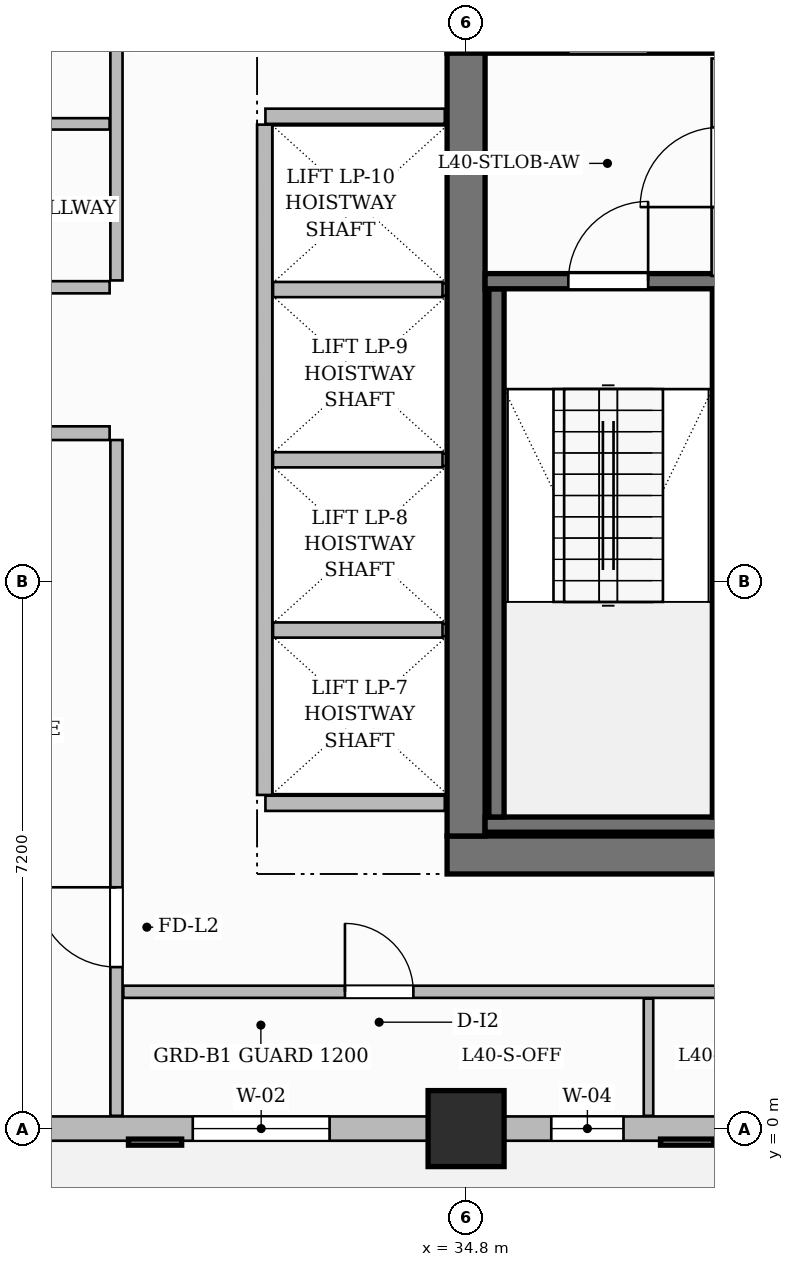
"""IFC4 building model, lengths in metres.
Left out: names, types, materials, properties, quantities, classifications, styles, units other than length and angle.
Written with IfcOpenShell. Run it as: python <this file> out.ifc"""

import sys

from ifc_helpers import new_model, si_unit, direction, frame, frame_2d, origin, origin_2d, place, context, subcontext, project, spatial, rectangle, extrude, source, transform, mapped, element, fill, save


model = new_model("IFC4")
c1 = context("Model", 3, precision=1e-05, world=origin(), true_north=direction((0.0, 1.0)))
c2 = subcontext(c1, "Body", "Model", "MODEL_VIEW")
j1 = project(units=[si_unit("LENGTHUNIT", "METRE"), si_unit("PLANEANGLEUNIT", "RADIAN")], contexts=[c1])
p1 = place(None, origin())
s1 = spatial("IfcSite", under=j1, at=p1, CompositionType="ELEMENT")
p2 = place(p1, origin())
s2 = spatial("IfcBuilding", under=s1, at=p2, CompositionType="ELEMENT")
p3 = place(p2, frame((0.0, 0.0, 161.85)))
s3 = spatial("IfcBuildingStorey", under=s2, at=p3, CompositionType="ELEMENT", Elevation=161.85)
p4 = place(p3, frame((34.55, 3.6, 0.0), z_axis=(0.0, 0.0, 1.0), x_axis=(1.0, 0.0, 0.0)))
e1 = element("IfcWall", 1, at=p4, inside=s3, PredefinedType="SHEAR", context=c2, shape_type="SweptSolid", body=[
    extrude(rectangle(XDim=15.5, YDim=0.5, at=frame_2d((7.75, 0.0))), origin(), (0.0, 0.0, 1.0), 3.85),
])
p5 = place(p4, frame((4.72, 0.0, 0.0)))
e2 = element("IfcOpeningElement", 2, at=p5, cuts=e1, PredefinedType="OPENING", context=c2, shape_type="SweptSolid", body=[
    extrude(rectangle(XDim=0.9, YDim=2.1, at=frame_2d((0.45, 1.05))), frame((0.0, 0.26, 0.0), z_axis=(0.0, -1.0, 0.0), x_axis=(1.0, 0.0, 0.0)), (0.0, 0.0, 1.0), 0.52),
])
p6 = place(p4, frame((7.1, 0.0, 0.0)))
e3 = element("IfcOpeningElement", 3, at=p6, cuts=e1, PredefinedType="OPENING", context=c2, shape_type="SweptSolid", body=[
    extrude(rectangle(XDim=0.9, YDim=2.1, at=frame_2d((0.45, 1.05))), frame((0.0, 0.26, 0.0), z_axis=(0.0, -1.0, 0.0), x_axis=(1.0, 0.0, 0.0)), (0.0, 0.0, 1.0), 0.52),
])
p7 = place(p3, frame((34.55, 14.4, 0.0), z_axis=(0.0, 0.0, 1.0), x_axis=(1.0, 0.0, 0.0)))
e4 = element("IfcWall", 4, at=p7, inside=s3, PredefinedType="SHEAR", context=c2, shape_type="SweptSolid", body=[
    extrude(rectangle(XDim=15.5, YDim=0.5, at=frame_2d((7.75, 0.0))), origin(), (0.0, 0.0, 1.0), 3.85),
])
p8 = place(p7, frame((5.38, 0.0, 0.0)))
e5 = element("IfcOpeningElement", 5, at=p8, cuts=e4, PredefinedType="OPENING", context=c2, shape_type="SweptSolid", body=[
    extrude(rectangle(XDim=1.5, YDim=2.2, at=frame_2d((0.75, 1.1))), frame((0.0, 0.26, 0.0), z_axis=(0.0, -1.0, 0.0), x_axis=(1.0, 0.0, 0.0)), (0.0, 0.0, 1.0), 0.52),
])
p9 = place(p7, frame((1.595, 0.0, 0.0)))
e6 = element("IfcOpeningElement", 6, at=p9, cuts=e4, PredefinedType="OPENING", context=c2, shape_type="SweptSolid", body=[
    extrude(rectangle(XDim=1.05, YDim=2.15, at=frame_2d((0.525, 1.075))), frame((0.0, 0.26, 0.0), z_axis=(0.0, -1.0, 0.0), x_axis=(1.0, 0.0, 0.0)), (0.0, 0.0, 1.0), 0.52),
])
p10 = place(p7, frame((11.225, 0.0, 0.0)))
e7 = element("IfcOpeningElement", 7, at=p10, cuts=e4, PredefinedType="OPENING", context=c2, shape_type="SweptSolid", body=[
    extrude(rectangle(XDim=1.05, YDim=2.15, at=frame_2d((0.525, 1.075))), frame((0.0, 0.26, 0.0), z_axis=(0.0, -1.0, 0.0), x_axis=(1.0, 0.0, 0.0)), (0.0, 0.0, 1.0), 0.52),
])
p11 = place(p3, frame((34.8, 3.85, 0.0), z_axis=(0.0, 0.0, 1.0), x_axis=(0.0, 1.0, 0.0)))
e8 = element("IfcWall", 8, at=p11, inside=s3, PredefinedType="SHEAR", context=c2, shape_type="SweptSolid", body=[
    extrude(rectangle(XDim=10.3, YDim=0.5, at=frame_2d((5.15, 0.0))), origin(), (0.0, 0.0, 1.0), 3.85),
])
m1 = source(origin(), c2, "Body", "SweptSolid", [
    extrude(rectangle(XDim=1.0, YDim=1.0, at=origin_2d()), origin(), (0.0, 0.0, 1.0), 3.85),
])
p12 = place(p3, frame((34.8, 0.0, 0.0), z_axis=(0.0, 0.0, 1.0), x_axis=(1.0, 0.0, 0.0)))
e9 = element("IfcColumn", 9, at=p12, inside=s3, PredefinedType="COLUMN", context=c2, shape_type="MappedRepresentation", body=[
    mapped(m1, transform((0.0, 0.0, 0.0), scale=1.0)),
])
p13 = place(p3, frame((35.05, 4.0, 0.0), z_axis=(0.0, 0.0, 1.0), x_axis=(1.0, 0.0, 0.0)))
e10 = element("IfcWall", 10, at=p13, inside=s3, PredefinedType="SHEAR", context=c2, shape_type="SweptSolid", body=[
    extrude(rectangle(XDim=3.19, YDim=0.2, at=frame_2d((1.595, 0.0))), origin(), (0.0, 0.0, 1.0), 3.85),
])
for number, where, z_axis, x_axis in (
    (11, (35.2, 4.1, 0.0), (0.0, 0.0, 1.0), (0.0, 1.0, 0.0)),
    (12, (38.14, 4.1, 0.0), (0.0, 0.0, 1.0), (0.0, 1.0, 0.0)),
):
    element("IfcWall", number, at=place(p3, frame(where, z_axis=z_axis, x_axis=x_axis)), inside=s3, PredefinedType="SHEAR", context=c2, shape_type="SweptSolid", body=[
        extrude(rectangle(XDim=6.95, YDim=0.2, at=frame_2d((3.475, 0.0))), origin(), (0.0, 0.0, 1.0), 3.85),
    ])
p14 = place(p3, frame((35.05, 11.15, 0.0), z_axis=(0.0, 0.0, 1.0), x_axis=(1.0, 0.0, 0.0)))
e13 = element("IfcWall", 13, at=p14, inside=s3, PredefinedType="SHEAR", context=c2, shape_type="SweptSolid", body=[
    extrude(rectangle(XDim=3.19, YDim=0.2, at=frame_2d((1.595, 0.0))), origin(), (0.0, 0.0, 1.0), 3.85),
])
p15 = place(p14, frame((1.095, 0.0, 0.0)))
e14 = element("IfcOpeningElement", 14, at=p15, cuts=e13, PredefinedType="OPENING", context=c2, shape_type="SweptSolid", body=[
    extrude(rectangle(XDim=1.05, YDim=2.2, at=frame_2d((0.525, 1.1))), frame((0.0, 0.11, 0.0), z_axis=(0.0, -1.0, 0.0), x_axis=(1.0, 0.0, 0.0)), (0.0, 0.0, 1.0), 0.22),
])
p16 = place(p3, frame((38.14, 11.22, 0.0), z_axis=(0.0, 0.0, 1.0), x_axis=(0.0, 1.0, 0.0)))
e15 = element("IfcWall", 15, at=p16, inside=s3, PredefinedType="PARTITIONING", context=c2, shape_type="SweptSolid", body=[
    extrude(rectangle(XDim=2.86, YDim=0.22, at=frame_2d((1.43, 0.0))), origin(), (0.0, 0.0, 1.0), 3.6),
])
p17 = place(p16, frame((0.905, 0.0, 0.0)))
e16 = element("IfcOpeningElement", 16, at=p17, cuts=e15, PredefinedType="OPENING", context=c2, shape_type="SweptSolid", body=[
    extrude(rectangle(XDim=1.05, YDim=2.15, at=frame_2d((0.525, 1.075))), frame((0.0, 0.12, 0.0), z_axis=(0.0, -1.0, 0.0), x_axis=(1.0, 0.0, 0.0)), (0.0, 0.0, 1.0), 0.24),
])
for number, where, z_axis, x_axis in (
    (17, (32.16, 4.28, 0.0), (0.0, 0.0, 1.0), (1.0, 0.0, 0.0)),
    (18, (32.16, 13.32, 0.0), (0.0, 0.0, 1.0), (1.0, 0.0, 0.0)),
):
    element("IfcWall", number, at=place(p3, frame(where, z_axis=z_axis, x_axis=x_axis)), inside=s3, PredefinedType="PARTITIONING", context=c2, shape_type="SweptSolid", body=[
        extrude(rectangle(XDim=2.36, YDim=0.2, at=frame_2d((1.18, 0.0))), origin(), (0.0, 0.0, 1.0), 3.6),
    ])
p18 = place(p3, frame((32.15, 4.39, 0.0), z_axis=(0.0, 0.0, 1.0), x_axis=(0.0, 1.0, 0.0)))
e19 = element("IfcWall", 19, at=p18, inside=s3, PredefinedType="PARTITIONING", context=c2, shape_type="SweptSolid", body=[
    extrude(rectangle(XDim=8.82, YDim=0.2, at=frame_2d((4.41, 0.0))), origin(), (0.0, 0.0, 1.0), 3.6),
])
for number, where, z_axis, x_axis in (
    (20, (32.26, 6.56, 0.0), (0.0, 0.0, 1.0), (1.0, 0.0, 0.0)),
    (21, (32.26, 8.8, 0.0), (0.0, 0.0, 1.0), (1.0, 0.0, 0.0)),
    (22, (32.26, 11.04, 0.0), (0.0, 0.0, 1.0), (1.0, 0.0, 0.0)),
):
    element("IfcWall", number, at=place(p3, frame(where, z_axis=z_axis, x_axis=x_axis)), inside=s3, PredefinedType="PARTITIONING", context=c2, shape_type="SweptSolid", body=[
        extrude(rectangle(XDim=2.23, YDim=0.2, at=frame_2d((1.115, 0.0))), origin(), (0.0, 0.0, 1.0), 3.6),
    ])
p19 = place(p3, frame((14.568, 9.15, 0.0), z_axis=(0.0, 0.0, 1.0), x_axis=(1.0, 0.0, 0.0)))
e23 = element("IfcWall", 23, at=p19, inside=s3, PredefinedType="PARTITIONING", context=c2, shape_type="SweptSolid", body=[
    extrude(rectangle(XDim=15.542, YDim=0.18, at=frame_2d((7.771, 0.0))), origin(), (0.0, 0.0, 1.0), 3.6),
])
p20 = place(p19, frame((1.457, 0.0, 0.0)))
e24 = element("IfcOpeningElement", 24, at=p20, cuts=e23, PredefinedType="OPENING", context=c2, shape_type="SweptSolid", body=[
    extrude(rectangle(XDim=0.95, YDim=2.15, at=frame_2d((0.475, 1.075))), frame((0.0, 0.1, 0.0), z_axis=(0.0, -1.0, 0.0), x_axis=(1.0, 0.0, 0.0)), (0.0, 0.0, 1.0), 0.2),
])
p21 = place(p19, frame((6.117, 0.0, 0.0)))
e25 = element("IfcOpeningElement", 25, at=p21, cuts=e23, PredefinedType="OPENING", context=c2, shape_type="SweptSolid", body=[
    extrude(rectangle(XDim=0.95, YDim=2.15, at=frame_2d((0.475, 1.075))), frame((0.0, 0.1, 0.0), z_axis=(0.0, -1.0, 0.0), x_axis=(1.0, 0.0, 0.0)), (0.0, 0.0, 1.0), 0.2),
])
p22 = place(p19, frame((10.157, 0.0, 0.0)))
e26 = element("IfcOpeningElement", 26, at=p22, cuts=e23, PredefinedType="OPENING", context=c2, shape_type="SweptSolid", body=[
    extrude(rectangle(XDim=0.95, YDim=2.15, at=frame_2d((0.475, 1.075))), frame((0.0, 0.1, 0.0), z_axis=(0.0, -1.0, 0.0), x_axis=(1.0, 0.0, 0.0)), (0.0, 0.0, 1.0), 0.2),
])
p23 = place(p19, frame((13.397, 0.0, 0.0)))
e27 = element("IfcOpeningElement", 27, at=p23, cuts=e23, PredefinedType="OPENING", context=c2, shape_type="SweptSolid", body=[
    extrude(rectangle(XDim=0.95, YDim=2.15, at=frame_2d((0.475, 1.075))), frame((0.0, 0.1, 0.0), z_axis=(0.0, -1.0, 0.0), x_axis=(1.0, 0.0, 0.0)), (0.0, 0.0, 1.0), 0.2),
])
p24 = place(p3, frame((14.568, 11.07, 0.0), z_axis=(0.0, 0.0, 1.0), x_axis=(1.0, 0.0, 0.0)))
e28 = element("IfcWall", 28, at=p24, inside=s3, PredefinedType="PARTITIONING", context=c2, shape_type="SweptSolid", body=[
    extrude(rectangle(XDim=15.542, YDim=0.16, at=frame_2d((7.771, 0.0))), origin(), (0.0, 0.0, 1.0), 3.6),
])
p25 = place(p24, frame((7.122, 0.0, 0.0)))
e29 = element("IfcOpeningElement", 29, at=p25, cuts=e28, PredefinedType="OPENING", context=c2, shape_type="SweptSolid", body=[
    extrude(rectangle(XDim=1.05, YDim=2.25, at=frame_2d((0.525, 1.125))), frame((0.0, 0.09, 0.0), z_axis=(0.0, -1.0, 0.0), x_axis=(1.0, 0.0, 0.0)), (0.0, 0.0, 1.0), 0.18),
])
p26 = place(p3, frame((30.2, 11.16, 0.0), z_axis=(0.0, 0.0, 1.0), x_axis=(0.0, 1.0, 0.0)))
e30 = element("IfcWall", 30, at=p26, inside=s3, PredefinedType="PARTITIONING", context=c2, shape_type="SweptSolid", body=[
    extrude(rectangle(XDim=6.3, YDim=0.16, at=frame_2d((3.15, 0.0))), origin(), (0.0, 0.0, 1.0), 3.6),
])
p27 = place(p3, frame((30.2, 0.168, 0.0), z_axis=(0.0, 0.0, 1.0), x_axis=(0.0, 1.0, 0.0)))
e31 = element("IfcWall", 31, at=p27, inside=s3, PredefinedType="PARTITIONING", context=c2, shape_type="SweptSolid", body=[
    extrude(rectangle(XDim=8.892, YDim=0.16, at=frame_2d((4.446, 0.0))), origin(), (0.0, 0.0, 1.0), 3.6),
])
p28 = place(p27, frame((1.957, 0.0, 0.0)))
e32 = element("IfcOpeningElement", 32, at=p28, cuts=e31, PredefinedType="OPENING", context=c2, shape_type="SweptSolid", body=[
    extrude(rectangle(XDim=1.05, YDim=2.15, at=frame_2d((0.525, 1.075))), frame((0.0, 0.09, 0.0), z_axis=(0.0, -1.0, 0.0), x_axis=(1.0, 0.0, 0.0)), (0.0, 0.0, 1.0), 0.18),
])
p29 = place(p3, frame((30.29, 1.8, 0.0), z_axis=(0.0, 0.0, 1.0), x_axis=(1.0, 0.0, 0.0)))
e33 = element("IfcWall", 33, at=p29, inside=s3, PredefinedType="PARTITIONING", context=c2, shape_type="SweptSolid", body=[
    extrude(rectangle(XDim=19.37, YDim=0.16, at=frame_2d((9.685, 0.0))), origin(), (0.0, 0.0, 1.0), 3.6),
])
p30 = place(p29, frame((2.916, 0.0, 0.0)))
e34 = element("IfcOpeningElement", 34, at=p30, cuts=e33, PredefinedType="OPENING", context=c2, shape_type="SweptSolid", body=[
    extrude(rectangle(XDim=0.9, YDim=2.15, at=frame_2d((0.45, 1.075))), frame((0.0, 0.09, 0.0), z_axis=(0.0, -1.0, 0.0), x_axis=(1.0, 0.0, 0.0)), (0.0, 0.0, 1.0), 0.18),
])
p31 = place(p29, frame((9.66, 0.0, 0.0)))
e35 = element("IfcOpeningElement", 35, at=p31, cuts=e33, PredefinedType="OPENING", context=c2, shape_type="SweptSolid", body=[
    extrude(rectangle(XDim=0.9, YDim=2.15, at=frame_2d((0.45, 1.075))), frame((0.0, 0.09, 0.0), z_axis=(0.0, -1.0, 0.0), x_axis=(1.0, 0.0, 0.0)), (0.0, 0.0, 1.0), 0.18),
])
p32 = place(p29, frame((15.86, 0.0, 0.0)))
e36 = element("IfcOpeningElement", 36, at=p32, cuts=e33, PredefinedType="OPENING", context=c2, shape_type="SweptSolid", body=[
    extrude(rectangle(XDim=0.9, YDim=2.15, at=frame_2d((0.45, 1.075))), frame((0.0, 0.09, 0.0), z_axis=(0.0, -1.0, 0.0), x_axis=(1.0, 0.0, 0.0)), (0.0, 0.0, 1.0), 0.18),
])
p33 = place(p3, frame((37.2, 0.168, 0.0), z_axis=(0.0, 0.0, 1.0), x_axis=(0.0, 1.0, 0.0)))
e37 = element("IfcWall", 37, at=p33, inside=s3, PredefinedType="PARTITIONING", context=c2, shape_type="SweptSolid", body=[
    extrude(rectangle(XDim=1.542, YDim=0.125, at=frame_2d((0.771, 0.0))), origin(), (0.0, 0.0, 1.0), 3.6),
])
p34 = place(p3, frame((24.89, 13.22, 0.0), z_axis=(0.0, 0.0, 1.0), x_axis=(1.0, 0.0, 0.0)))
e38 = element("IfcWall", 38, at=p34, inside=s3, PredefinedType="PARTITIONING", context=c2, shape_type="SweptSolid", body=[
    extrude(rectangle(XDim=5.22, YDim=0.15, at=frame_2d((2.61, 0.0))), origin(), (0.0, 0.0, 1.0), 3.6),
])
p35 = place(p34, frame((1.11, 0.0, 0.0)))
e39 = element("IfcOpeningElement", 39, at=p35, cuts=e38, PredefinedType="OPENING", context=c2, shape_type="SweptSolid", body=[
    extrude(rectangle(XDim=0.9, YDim=2.15, at=frame_2d((0.45, 1.075))), frame((0.0, 0.085, 0.0), z_axis=(0.0, -1.0, 0.0), x_axis=(1.0, 0.0, 0.0)), (0.0, 0.0, 1.0), 0.17),
])
p36 = place(p3, frame((14.4, 0.0, 0.0), z_axis=(0.0, 0.0, 1.0), x_axis=(1.0, 0.0, 0.0)))
e40 = element("IfcWall", 40, at=p36, inside=s3, PredefinedType="SOLIDWALL", context=c2, shape_type="SweptSolid", body=[
    extrude(rectangle(XDim=35.4, YDim=0.32, at=frame_2d((17.7, 0.0))), origin(), (0.0, 0.0, 1.0), 3.085),
])
p37 = place(p36, frame((0.85, 0.0, 0.0)))
e41 = element("IfcOpeningElement", 41, at=p37, cuts=e40, PredefinedType="OPENING", context=c2, shape_type="SweptSolid", body=[
    extrude(rectangle(XDim=1.2, YDim=2.2, at=frame_2d((0.6, 1.1))), frame((0.0, 0.17, 0.0), z_axis=(0.0, -1.0, 0.0), x_axis=(1.0, 0.0, 0.0)), (0.0, 0.0, 1.0), 0.34),
])
p38 = place(p36, frame((2.696, 0.0, 0.8)))
e42 = element("IfcOpeningElement", 42, at=p38, cuts=e40, PredefinedType="OPENING", context=c2, shape_type="SweptSolid", body=[
    extrude(rectangle(XDim=1.15, YDim=1.8, at=frame_2d((0.575, 0.9))), frame((0.0, 0.17, 0.0), z_axis=(0.0, -1.0, 0.0), x_axis=(1.0, 0.0, 0.0)), (0.0, 0.0, 1.0), 0.34),
])
p39 = place(p36, frame((4.604, 0.0, 0.8)))
e43 = element("IfcOpeningElement", 43, at=p39, cuts=e40, PredefinedType="OPENING", context=c2, shape_type="SweptSolid", body=[
    extrude(rectangle(XDim=1.4, YDim=1.85, at=frame_2d((0.7, 0.925))), frame((0.0, 0.17, 0.0), z_axis=(0.0, -1.0, 0.0), x_axis=(1.0, 0.0, 0.0)), (0.0, 0.0, 1.0), 0.34),
])
p40 = place(p36, frame((8.181, 0.0, 0.8)))
e44 = element("IfcOpeningElement", 44, at=p40, cuts=e40, PredefinedType="OPENING", context=c2, shape_type="SweptSolid", body=[
    extrude(rectangle(XDim=0.95, YDim=1.75, at=frame_2d((0.475, 0.875))), frame((0.0, 0.17, 0.0), z_axis=(0.0, -1.0, 0.0), x_axis=(1.0, 0.0, 0.0)), (0.0, 0.0, 1.0), 0.34),
])
p41 = place(p36, frame((9.9, 0.0, 0.8)))
e45 = element("IfcOpeningElement", 45, at=p41, cuts=e40, PredefinedType="OPENING", context=c2, shape_type="SweptSolid", body=[
    extrude(rectangle(XDim=1.8, YDim=1.85, at=frame_2d((0.9, 0.925))), frame((0.0, 0.17, 0.0), z_axis=(0.0, -1.0, 0.0), x_axis=(1.0, 0.0, 0.0)), (0.0, 0.0, 1.0), 0.34),
])
p42 = place(p36, frame((12.469, 0.0, 0.8)))
e46 = element("IfcOpeningElement", 46, at=p42, cuts=e40, PredefinedType="OPENING", context=c2, shape_type="SweptSolid", body=[
    extrude(rectangle(XDim=0.95, YDim=1.75, at=frame_2d((0.475, 0.875))), frame((0.0, 0.17, 0.0), z_axis=(0.0, -1.0, 0.0), x_axis=(1.0, 0.0, 0.0)), (0.0, 0.0, 1.0), 0.34),
])
p43 = place(p36, frame((16.804, 0.0, 0.8)))
e47 = element("IfcOpeningElement", 47, at=p43, cuts=e40, PredefinedType="OPENING", context=c2, shape_type="SweptSolid", body=[
    extrude(rectangle(XDim=1.8, YDim=1.85, at=frame_2d((0.9, 0.925))), frame((0.0, 0.17, 0.0), z_axis=(0.0, -1.0, 0.0), x_axis=(1.0, 0.0, 0.0)), (0.0, 0.0, 1.0), 0.34),
])
p44 = place(p36, frame((21.521, 0.0, 0.8)))
e48 = element("IfcOpeningElement", 48, at=p44, cuts=e40, PredefinedType="OPENING", context=c2, shape_type="SweptSolid", body=[
    extrude(rectangle(XDim=0.95, YDim=1.75, at=frame_2d((0.475, 0.875))), frame((0.0, 0.17, 0.0), z_axis=(0.0, -1.0, 0.0), x_axis=(1.0, 0.0, 0.0)), (0.0, 0.0, 1.0), 0.34),
])
p45 = place(p36, frame((23.904, 0.0, 0.8)))
e49 = element("IfcOpeningElement", 49, at=p45, cuts=e40, PredefinedType="OPENING", context=c2, shape_type="SweptSolid", body=[
    extrude(rectangle(XDim=1.8, YDim=1.85, at=frame_2d((0.9, 0.925))), frame((0.0, 0.17, 0.0), z_axis=(0.0, -1.0, 0.0), x_axis=(1.0, 0.0, 0.0)), (0.0, 0.0, 1.0), 0.34),
])
p46 = place(p36, frame((29.681, 0.0, 0.8)))
e50 = element("IfcOpeningElement", 50, at=p46, cuts=e40, PredefinedType="OPENING", context=c2, shape_type="SweptSolid", body=[
    extrude(rectangle(XDim=1.8, YDim=1.85, at=frame_2d((0.9, 0.925))), frame((0.0, 0.17, 0.0), z_axis=(0.0, -1.0, 0.0), x_axis=(1.0, 0.0, 0.0)), (0.0, 0.0, 1.0), 0.34),
])
p47 = place(p36, frame((32.327, 0.0, 0.8)))
e51 = element("IfcOpeningElement", 51, at=p47, cuts=e40, PredefinedType="OPENING", context=c2, shape_type="SweptSolid", body=[
    extrude(rectangle(XDim=1.8, YDim=1.85, at=frame_2d((0.9, 0.925))), frame((0.0, 0.17, 0.0), z_axis=(0.0, -1.0, 0.0), x_axis=(1.0, 0.0, 0.0)), (0.0, 0.0, 1.0), 0.34),
])
m2 = source(origin(), c2, "Body", "SweptSolid", [
    extrude(rectangle(XDim=1.05, YDim=2.2, at=frame_2d((0.525, 1.1))), frame((0.0, 0.025, 0.0), z_axis=(0.0, -1.0, 0.0), x_axis=(1.0, 0.0, 0.0)), (0.0, 0.0, 1.0), 0.05),
])
p48 = place(p15, origin())
e52 = element("IfcDoor", 52, at=p48, inside=s3, OperationType="SINGLE_SWING_RIGHT", PredefinedType="DOOR", context=c2, shape_type="MappedRepresentation", body=[
    mapped(m2, transform((0.0, 0.0, 0.0), scale=1.0)),
])
fill(e14, e52)
m3 = source(origin(), c2, "Body", "SweptSolid", [
    extrude(rectangle(XDim=1.05, YDim=2.15, at=frame_2d((0.525, 1.075))), frame((0.0, 0.025, 0.0), z_axis=(0.0, -1.0, 0.0), x_axis=(1.0, 0.0, 0.0)), (0.0, 0.0, 1.0), 0.05),
])
p49 = place(p28, origin())
e53 = element("IfcDoor", 53, at=p49, inside=s3, OperationType="SINGLE_SWING_RIGHT", PredefinedType="DOOR", context=c2, shape_type="MappedRepresentation", body=[
    mapped(m3, transform((0.0, 0.0, 0.0), scale=1.0)),
])
fill(e32, e53)
m4 = source(origin(), c2, "Body", "SweptSolid", [
    extrude(rectangle(XDim=0.9, YDim=2.15, at=frame_2d((0.45, 1.075))), frame((0.0, 0.025, 0.0), z_axis=(0.0, -1.0, 0.0), x_axis=(1.0, 0.0, 0.0)), (0.0, 0.0, 1.0), 0.05),
])
p50 = place(p30, origin())
e54 = element("IfcDoor", 54, at=p50, inside=s3, OperationType="SINGLE_SWING_LEFT", PredefinedType="DOOR", context=c2, shape_type="MappedRepresentation", body=[
    mapped(m4, transform((0.0, 0.0, 0.0), scale=1.0)),
])
fill(e34, e54)
m5 = source(origin(), c2, "Body", "SweptSolid", [
    extrude(rectangle(XDim=1.8, YDim=1.85, at=frame_2d((0.9, 0.925))), frame((0.0, 0.03, 0.0), z_axis=(0.0, -1.0, 0.0), x_axis=(1.0, 0.0, 0.0)), (0.0, 0.0, 1.0), 0.06),
])
p51 = place(p43, origin())
e55 = element("IfcWindow", 55, at=p51, inside=s3, PartitioningType="DOUBLE_PANEL_VERTICAL", PredefinedType="WINDOW", context=c2, shape_type="MappedRepresentation", body=[
    mapped(m5, transform((0.0, 0.0, 0.0), scale=1.0)),
])
fill(e47, e55)
m6 = source(origin(), c2, "Body", "SweptSolid", [
    extrude(rectangle(XDim=0.95, YDim=1.75, at=frame_2d((0.475, 0.875))), frame((0.0, 0.03, 0.0), z_axis=(0.0, -1.0, 0.0), x_axis=(1.0, 0.0, 0.0)), (0.0, 0.0, 1.0), 0.06),
])
p52 = place(p44, origin())
e56 = element("IfcWindow", 56, at=p52, inside=s3, PartitioningType="SINGLE_PANEL", PredefinedType="WINDOW", context=c2, shape_type="MappedRepresentation", body=[
    mapped(m6, transform((0.0, 0.0, 0.0), scale=1.0)),
])
fill(e48, e56)
save(model, sys.argv[1])
